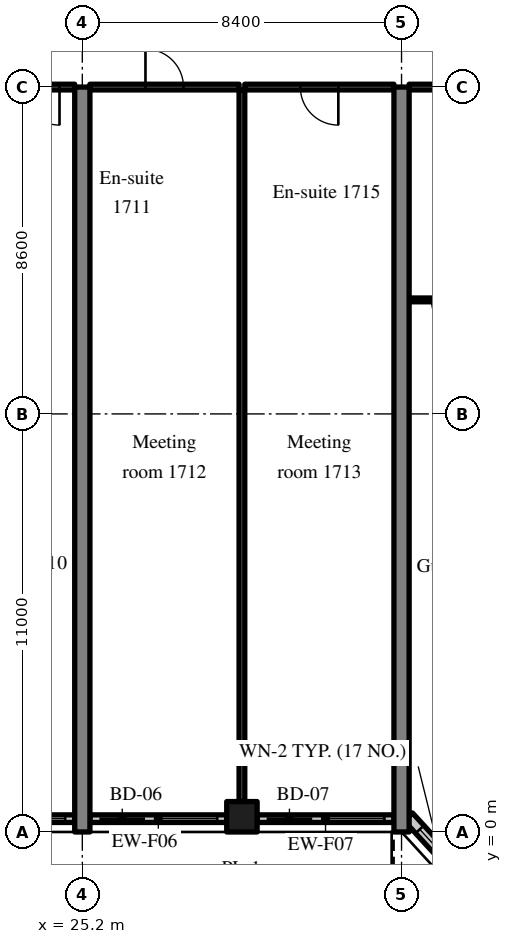
"""IFC4 building model, lengths in metres.
Left out: names, types, materials, properties, quantities, classifications, styles, units other than length and angle.
Written with IfcOpenShell. Run it as: python <this file> out.ifc"""

import sys

from ifc_helpers import new_model, si_unit, direction, frame, frame_2d, origin, origin_2d, place, context, subcontext, project, spatial, rectangle, extrude, source, transform, mapped, element, fill, save


model = new_model("IFC4")
c1 = context("Model", 3, precision=1e-05, world=origin(), true_north=direction((0.0, 1.0)))
c2 = subcontext(c1, "Body", "Model", "MODEL_VIEW")
j1 = project(units=[si_unit("LENGTHUNIT", "METRE"), si_unit("PLANEANGLEUNIT", "RADIAN")], contexts=[c1])
p1 = place(None, origin())
s1 = spatial("IfcSite", under=j1, at=p1, CompositionType="ELEMENT")
p2 = place(p1, origin())
s2 = spatial("IfcBuilding", under=s1, at=p2, CompositionType="ELEMENT")
p3 = place(p2, frame((0.0, 0.0, 73.4)))
s3 = spatial("IfcBuildingStorey", under=s2, at=p3, CompositionType="ELEMENT", Elevation=73.4)
m1 = source(origin(), c2, "Body", "SweptSolid", [
    extrude(rectangle(XDim=19.6, YDim=0.4, at=frame_2d((9.8, 0.0))), origin(), (0.0, 0.0, 1.0), 3.52),
])
for number, where, z_axis, x_axis in (
    (1, (25.2, 0.0, 0.0), (0.0, 0.0, 1.0), (0.0, 1.0, 0.0)),
    (2, (33.6, 0.0, 0.0), (0.0, 0.0, 1.0), (0.0, 1.0, 0.0)),
):
    element("IfcWall", number, at=place(p3, frame(where, z_axis=z_axis, x_axis=x_axis)), inside=s3, PredefinedType="SHEAR", context=c2, shape_type="MappedRepresentation", body=[
        mapped(m1, transform((0.0, 0.0, 0.0), scale=1.0)),
    ])
m2 = source(origin(), c2, "Body", "SweptSolid", [
    extrude(rectangle(XDim=0.8, YDim=0.8, at=origin_2d()), origin(), (0.0, 0.0, 1.0), 3.52),
])
p4 = place(p3, frame((29.4, 0.4, 0.0), z_axis=(0.0, 0.0, 1.0), x_axis=(1.0, 0.0, 0.0)))
e3 = element("IfcColumn", 3, at=p4, inside=s3, PredefinedType="COLUMN", context=c2, shape_type="MappedRepresentation", body=[
    mapped(m2, transform((0.0, 0.0, 0.0), scale=1.0)),
])
m3 = source(origin(), c2, "Body", "SweptSolid", [
    extrude(rectangle(XDim=3.6, YDim=0.2, at=frame_2d((1.8, 0.0))), origin(), (0.0, 0.0, 1.0), 2.82),
])
p5 = place(p3, frame((21.4, 0.35, 0.0), z_axis=(0.0, 0.0, 1.0), x_axis=(1.0, 0.0, 0.0)))
e4 = element("IfcWall", 4, at=p5, inside=s3, PredefinedType="SOLIDWALL", context=c2, shape_type="MappedRepresentation", body=[
    mapped(m3, transform((0.0, 0.0, 0.0), scale=1.0)),
])
m4 = source(origin(), c2, "Body", "SweptSolid", [
    extrude(rectangle(XDim=1.2, YDim=2.4, at=frame_2d((0.6, 1.2))), frame((0.0, 0.11, 0.0), z_axis=(0.0, -1.0, 0.0), x_axis=(1.0, 0.0, 0.0)), (0.0, 0.0, 1.0), 0.22),
])
p6 = place(p5, frame((0.25, 0.0, 0.0)))
e5 = element("IfcOpeningElement", 5, at=p6, cuts=e4, PredefinedType="OPENING", context=c2, shape_type="MappedRepresentation", body=[
    mapped(m4, transform((0.0, 0.0, 0.0), scale=1.0)),
])
m5 = source(origin(), c2, "Body", "SweptSolid", [
    extrude(rectangle(XDim=1.5, YDim=1.5, at=frame_2d((0.75, 0.75))), frame((0.0, 0.11, 0.0), z_axis=(0.0, -1.0, 0.0), x_axis=(1.0, 0.0, 0.0)), (0.0, 0.0, 1.0), 0.22),
])
p7 = place(p5, frame((1.85, 0.0, 0.9)))
e6 = element("IfcOpeningElement", 6, at=p7, cuts=e4, PredefinedType="OPENING", context=c2, shape_type="MappedRepresentation", body=[
    mapped(m5, transform((0.0, 0.0, 0.0), scale=1.0)),
])
p8 = place(p3, frame((25.4, 0.35, 0.0), z_axis=(0.0, 0.0, 1.0), x_axis=(1.0, 0.0, 0.0)))
e7 = element("IfcWall", 7, at=p8, inside=s3, PredefinedType="SOLIDWALL", context=c2, shape_type="MappedRepresentation", body=[
    mapped(m3, transform((0.0, 0.0, 0.0), scale=1.0)),
])
p9 = place(p8, frame((0.25, 0.0, 0.0)))
e8 = element("IfcOpeningElement", 8, at=p9, cuts=e7, PredefinedType="OPENING", context=c2, shape_type="MappedRepresentation", body=[
    mapped(m4, transform((0.0, 0.0, 0.0), scale=1.0)),
])
p10 = place(p8, frame((1.85, 0.0, 0.9)))
e9 = element("IfcOpeningElement", 9, at=p10, cuts=e7, PredefinedType="OPENING", context=c2, shape_type="MappedRepresentation", body=[
    mapped(m5, transform((0.0, 0.0, 0.0), scale=1.0)),
])
m6 = source(origin(), c2, "Body", "SweptSolid", [
    extrude(rectangle(XDim=3.6, YDim=0.2, at=frame_2d((1.8, 0.0))), origin(), (0.0, 0.0, 1.0), 2.82),
])
p11 = place(p3, frame((29.8, 0.35, 0.0), z_axis=(0.0, 0.0, 1.0), x_axis=(1.0, 0.0, 0.0)))
e10 = element("IfcWall", 10, at=p11, inside=s3, PredefinedType="SOLIDWALL", context=c2, shape_type="MappedRepresentation", body=[
    mapped(m6, transform((0.0, 0.0, 0.0), scale=1.0)),
])
p12 = place(p11, frame((0.25, 0.0, 0.0)))
e11 = element("IfcOpeningElement", 11, at=p12, cuts=e10, PredefinedType="OPENING", context=c2, shape_type="MappedRepresentation", body=[
    mapped(m4, transform((0.0, 0.0, 0.0), scale=1.0)),
])
p13 = place(p11, frame((1.85, 0.0, 0.9)))
e12 = element("IfcOpeningElement", 12, at=p13, cuts=e10, PredefinedType="OPENING", context=c2, shape_type="MappedRepresentation", body=[
    mapped(m5, transform((0.0, 0.0, 0.0), scale=1.0)),
])
m7 = source(origin(), c2, "Body", "SweptSolid", [
    extrude(rectangle(XDim=2.398, YDim=0.3, at=frame_2d((1.199, 0.0))), origin(), (0.0, 0.0, 1.0), 3.52),
])
p14 = place(p3, frame((33.776, 0.4, 0.0), z_axis=(0.0, 0.0, 1.0), x_axis=(0.675374189419, -0.737475222815, 0.0)))
e13 = element("IfcWall", 13, at=p14, inside=s3, PredefinedType="SOLIDWALL", context=c2, shape_type="MappedRepresentation", body=[
    mapped(m7, transform((0.0, 0.0, 0.0), scale=1.0)),
])
m8 = source(origin(), c2, "Body", "SweptSolid", [
    extrude(rectangle(XDim=1.5, YDim=2.0, at=frame_2d((0.75, 1.0))), frame((0.0, 0.16, 0.0), z_axis=(0.0, -1.0, 0.0), x_axis=(1.0, 0.0, 0.0)), (0.0, 0.0, 1.0), 0.32),
])
p15 = place(p14, frame((0.449, 0.0, 0.9)))
e14 = element("IfcOpeningElement", 14, at=p15, cuts=e13, PredefinedType="OPENING", context=c2, shape_type="MappedRepresentation", body=[
    mapped(m8, transform((0.0, 0.0, 0.0), scale=1.0)),
])
m9 = source(origin(), c2, "Body", "SweptSolid", [
    extrude(rectangle(XDim=3.925, YDim=0.15, at=frame_2d((1.962, 0.0))), origin(), (0.0, 0.0, 1.0), 2.82),
])
p16 = place(p3, frame((21.075, 19.6, 0.0), z_axis=(0.0, 0.0, 1.0), x_axis=(1.0, 0.0, 0.0)))
e15 = element("IfcWall", 15, at=p16, inside=s3, PredefinedType="PARTITIONING", context=c2, shape_type="MappedRepresentation", body=[
    mapped(m9, transform((0.0, 0.0, 0.0), scale=1.0)),
])
m10 = source(origin(), c2, "Body", "SweptSolid", [
    extrude(rectangle(XDim=1.0, YDim=2.1, at=frame_2d((0.5, 1.05))), frame((0.0, 0.085, 0.0), z_axis=(0.0, -1.0, 0.0), x_axis=(1.0, 0.0, 0.0)), (0.0, 0.0, 1.0), 0.17),
])
p17 = place(p16, frame((2.525, 0.0, 0.0)))
e16 = element("IfcOpeningElement", 16, at=p17, cuts=e15, PredefinedType="OPENING", context=c2, shape_type="MappedRepresentation", body=[
    mapped(m10, transform((0.0, 0.0, 0.0), scale=1.0)),
])
p18 = place(p3, frame((25.4, 19.6, 0.0), z_axis=(0.0, 0.0, 1.0), x_axis=(1.0, 0.0, 0.0)))
e17 = element("IfcWall", 17, at=p18, inside=s3, PredefinedType="PARTITIONING", context=c2, shape_type="MappedRepresentation", body=[
    mapped(m9, transform((0.0, 0.0, 0.0), scale=1.0)),
])
p19 = place(p18, frame((1.462, 0.0, 0.0)))
e18 = element("IfcOpeningElement", 18, at=p19, cuts=e17, PredefinedType="OPENING", context=c2, shape_type="MappedRepresentation", body=[
    mapped(m10, transform((0.0, 0.0, 0.0), scale=1.0)),
])
m11 = source(origin(), c2, "Body", "SweptSolid", [
    extrude(rectangle(XDim=3.925, YDim=0.15, at=frame_2d((1.962, 0.0))), origin(), (0.0, 0.0, 1.0), 2.82),
])
p20 = place(p3, frame((29.475, 19.6, 0.0), z_axis=(0.0, 0.0, 1.0), x_axis=(1.0, 0.0, 0.0)))
e19 = element("IfcWall", 19, at=p20, inside=s3, PredefinedType="PARTITIONING", context=c2, shape_type="MappedRepresentation", body=[
    mapped(m11, transform((0.0, 0.0, 0.0), scale=1.0)),
])
p21 = place(p20, frame((1.462, 0.0, 0.0)))
e20 = element("IfcOpeningElement", 20, at=p21, cuts=e19, PredefinedType="OPENING", context=c2, shape_type="MappedRepresentation", body=[
    mapped(m10, transform((0.0, 0.0, 0.0), scale=1.0)),
])
m12 = source(origin(), c2, "Body", "SweptSolid", [
    extrude(rectangle(XDim=18.725, YDim=0.15, at=frame_2d((9.362, 0.0))), origin(), (0.0, 0.0, 1.0), 3.52),
])
p22 = place(p3, frame((29.4, 0.8, 0.0), z_axis=(0.0, 0.0, 1.0), x_axis=(0.0, 1.0, 0.0)))
e21 = element("IfcWall", 21, at=p22, inside=s3, PredefinedType="PARTITIONING", context=c2, shape_type="MappedRepresentation", body=[
    mapped(m12, transform((0.0, 0.0, 0.0), scale=1.0)),
])
m13 = source(origin(), c2, "Body", "SweptSolid", [
    extrude(rectangle(XDim=2.075, YDim=0.1, at=frame_2d((1.038, 0.0))), origin(), (0.0, 0.0, 1.0), 3.52),
])
p23 = place(p3, frame((33.8, 14.0, 0.0), z_axis=(0.0, 0.0, 1.0), x_axis=(1.0, 0.0, 0.0)))
e22 = element("IfcWall", 22, at=p23, inside=s3, PredefinedType="PARTITIONING", context=c2, shape_type="MappedRepresentation", body=[
    mapped(m13, transform((0.0, 0.0, 0.0), scale=1.0)),
])
m14 = source(origin(), c2, "Body", "SweptSolid", [
    extrude(rectangle(XDim=0.9, YDim=2.1, at=frame_2d((0.45, 1.05))), frame((0.0, 0.06, 0.0), z_axis=(0.0, -1.0, 0.0), x_axis=(1.0, 0.0, 0.0)), (0.0, 0.0, 1.0), 0.12),
])
p24 = place(p23, frame((0.587, 0.0, 0.0)))
e23 = element("IfcOpeningElement", 23, at=p24, cuts=e22, PredefinedType="OPENING", context=c2, shape_type="MappedRepresentation", body=[
    mapped(m14, transform((0.0, 0.0, 0.0), scale=1.0)),
])
p25 = place(p3, frame((33.8, 19.6, 0.0), z_axis=(0.0, 0.0, 1.0), x_axis=(1.0, 0.0, 0.0)))
e24 = element("IfcWall", 24, at=p25, inside=s3, PredefinedType="PARTITIONING", context=c2, shape_type="MappedRepresentation", body=[
    mapped(m9, transform((0.0, 0.0, 0.0), scale=1.0)),
])
p26 = place(p25, frame((2.525, 0.0, 0.0)))
e25 = element("IfcOpeningElement", 25, at=p26, cuts=e24, PredefinedType="OPENING", context=c2, shape_type="MappedRepresentation", body=[
    mapped(m10, transform((0.0, 0.0, 0.0), scale=1.0)),
])
m15 = source(origin(), c2, "Body", "SweptSolid", [
    extrude(rectangle(XDim=1.5, YDim=1.5, at=frame_2d((0.75, 0.75))), frame((0.0, 0.03, 0.0), z_axis=(0.0, -1.0, 0.0), x_axis=(1.0, 0.0, 0.0)), (0.0, 0.0, 1.0), 0.06),
])
p27 = place(p7, origin())
e26 = element("IfcWindow", 26, at=p27, inside=s3, PartitioningType="SINGLE_PANEL", PredefinedType="WINDOW", context=c2, shape_type="MappedRepresentation", body=[
    mapped(m15, transform((0.0, 0.0, 0.0), scale=1.0)),
])
fill(e6, e26)
m16 = source(origin(), c2, "Body", "SweptSolid", [
    extrude(rectangle(XDim=1.2, YDim=2.4, at=frame_2d((0.6, 1.2))), frame((0.0, 0.025, 0.0), z_axis=(0.0, -1.0, 0.0), x_axis=(1.0, 0.0, 0.0)), (0.0, 0.0, 1.0), 0.05),
])
p28 = place(p9, origin())
e27 = element("IfcDoor", 27, at=p28, inside=s3, OperationType="SLIDING_TO_RIGHT", PredefinedType="DOOR", context=c2, shape_type="MappedRepresentation", body=[
    mapped(m16, transform((0.0, 0.0, 0.0), scale=1.0)),
])
fill(e8, e27)
p29 = place(p10, origin())
e28 = element("IfcWindow", 28, at=p29, inside=s3, PartitioningType="SINGLE_PANEL", PredefinedType="WINDOW", context=c2, shape_type="MappedRepresentation", body=[
    mapped(m15, transform((0.0, 0.0, 0.0), scale=1.0)),
])
fill(e9, e28)
p30 = place(p12, origin())
e29 = element("IfcDoor", 29, at=p30, inside=s3, OperationType="SLIDING_TO_LEFT", PredefinedType="DOOR", context=c2, shape_type="MappedRepresentation", body=[
    mapped(m16, transform((0.0, 0.0, 0.0), scale=1.0)),
])
fill(e11, e29)
p31 = place(p13, origin())
e30 = element("IfcWindow", 30, at=p31, inside=s3, PartitioningType="SINGLE_PANEL", PredefinedType="WINDOW", context=c2, shape_type="MappedRepresentation", body=[
    mapped(m15, transform((0.0, 0.0, 0.0), scale=1.0)),
])
fill(e12, e30)
m17 = source(origin(), c2, "Body", "SweptSolid", [
    extrude(rectangle(XDim=1.5, YDim=2.0, at=frame_2d((0.75, 1.0))), frame((0.0, 0.03, 0.0), z_axis=(0.0, -1.0, 0.0), x_axis=(1.0, 0.0, 0.0)), (0.0, 0.0, 1.0), 0.06),
])
p32 = place(p15, origin())
e31 = element("IfcWindow", 31, at=p32, inside=s3, PartitioningType="SINGLE_PANEL", PredefinedType="WINDOW", context=c2, shape_type="MappedRepresentation", body=[
    mapped(m17, transform((0.0, 0.0, 0.0), scale=1.0)),
])
fill(e14, e31)
m18 = source(origin(), c2, "Body", "SweptSolid", [
    extrude(rectangle(XDim=1.0, YDim=2.1, at=frame_2d((0.5, 1.05))), frame((0.0, 0.025, 0.0), z_axis=(0.0, -1.0, 0.0), x_axis=(1.0, 0.0, 0.0)), (0.0, 0.0, 1.0), 0.05),
])
p33 = place(p17, origin())
e32 = element("IfcDoor", 32, at=p33, inside=s3, OperationType="SINGLE_SWING_RIGHT", PredefinedType="DOOR", context=c2, shape_type="MappedRepresentation", body=[
    mapped(m18, transform((0.0, 0.0, 0.0), scale=1.0)),
])
fill(e16, e32)
p34 = place(p19, origin())
e33 = element("IfcDoor", 33, at=p34, inside=s3, OperationType="SINGLE_SWING_LEFT", PredefinedType="DOOR", context=c2, shape_type="MappedRepresentation", body=[
    mapped(m18, transform((0.0, 0.0, 0.0), scale=1.0)),
])
fill(e18, e33)
p35 = place(p21, origin())
e34 = element("IfcDoor", 34, at=p35, inside=s3, OperationType="SINGLE_SWING_RIGHT", PredefinedType="DOOR", context=c2, shape_type="MappedRepresentation", body=[
    mapped(m18, transform((0.0, 0.0, 0.0), scale=1.0)),
])
fill(e20, e34)
m19 = source(origin(), c2, "Body", "SweptSolid", [
    extrude(rectangle(XDim=0.9, YDim=2.1, at=frame_2d((0.45, 1.05))), frame((0.0, 0.025, 0.0), z_axis=(0.0, -1.0, 0.0), x_axis=(1.0, 0.0, 0.0)), (0.0, 0.0, 1.0), 0.05),
])
p36 = place(p24, origin())
e35 = element("IfcDoor", 35, at=p36, inside=s3, OperationType="SINGLE_SWING_RIGHT", PredefinedType="DOOR", context=c2, shape_type="MappedRepresentation", body=[
    mapped(m19, transform((0.0, 0.0, 0.0), scale=1.0)),
])
fill(e23, e35)
save(model, sys.argv[1])
